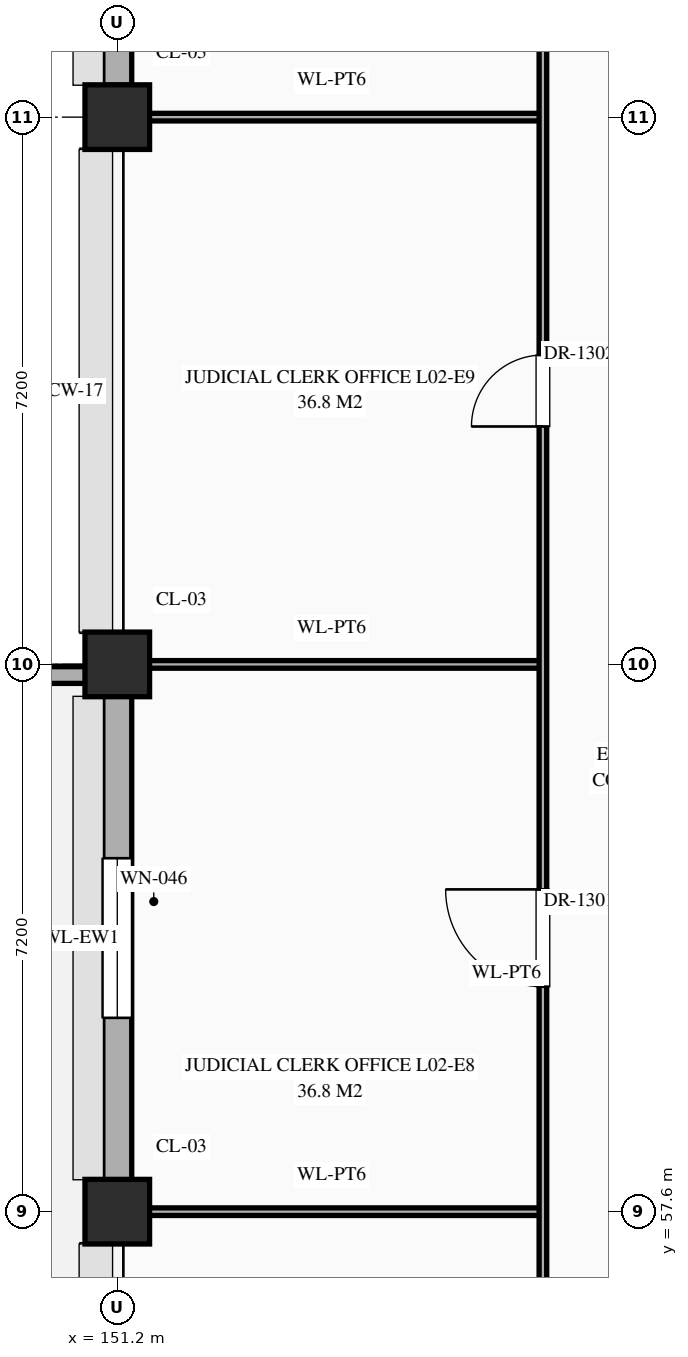
"""IFC4 building model, lengths in metres.
Left out: names, types, materials, properties, quantities, classifications, styles, units other than length and angle.
Written with IfcOpenShell. Run it as: python <this file> out.ifc"""

import sys

from ifc_helpers import new_model, si_unit, direction, frame, frame_2d, origin, origin_2d, place, context, subcontext, project, spatial, rectangle, extrude, element, fill, save


model = new_model("IFC4")
c1 = context("Model", 3, precision=1e-05, world=origin(), true_north=direction((0.0, 1.0)))
c2 = subcontext(c1, "Body", "Model", "MODEL_VIEW")
j1 = project(units=[si_unit("LENGTHUNIT", "METRE"), si_unit("PLANEANGLEUNIT", "RADIAN")], contexts=[c1])
p1 = place(None, origin())
s1 = spatial("IfcSite", under=j1, at=p1, CompositionType="ELEMENT")
p2 = place(p1, origin())
s2 = spatial("IfcBuilding", under=s1, at=p2, CompositionType="ELEMENT")
p3 = place(p2, frame((0.0, 0.0, 5.4)))
s3 = spatial("IfcBuildingStorey", under=s2, at=p3, CompositionType="ELEMENT", Elevation=5.4)
for number, where, z_axis, x_axis in (
    (1, (151.2, 57.6, 0.0), (0.0, 0.0, 1.0), (1.0, 0.0, 0.0)),
    (2, (151.2, 64.8, 0.0), (0.0, 0.0, 1.0), (1.0, 0.0, 0.0)),
    (3, (151.2, 72.0, 0.0), (0.0, 0.0, 1.0), (1.0, 0.0, 0.0)),
):
    element("IfcColumn", number, at=place(p3, frame(where, z_axis=z_axis, x_axis=x_axis)), inside=s3, PredefinedType="COLUMN", context=c2, shape_type="SweptSolid", body=[
        extrude(rectangle(XDim=0.85, YDim=0.85, at=origin_2d()), origin(), (0.0, 0.0, 1.0), 5.4),
    ])
p4 = place(p3, frame((151.2, 58.02, 0.0), z_axis=(0.0, 0.0, 1.0), x_axis=(0.0, 1.0, 0.0)))
e4 = element("IfcWall", 4, at=p4, inside=s3, PredefinedType="STANDARD", context=c2, shape_type="SweptSolid", body=[
    extrude(rectangle(XDim=6.36, YDim=0.38, at=frame_2d((3.18, 0.0))), origin(), (0.0, 0.0, 1.0), 4.47),
])
p5 = place(p4, frame((2.13, 0.0, 0.85)))
e5 = element("IfcOpeningElement", 5, at=p5, cuts=e4, PredefinedType="OPENING", context=c2, shape_type="SweptSolid", body=[
    extrude(rectangle(XDim=2.1, YDim=1.92, at=frame_2d((1.05, 0.96))), frame((0.0, 0.202, 0.0), z_axis=(0.0, -1.0, 0.0), x_axis=(1.0, 0.0, 0.0)), (0.0, 0.0, 1.0), 0.404),
])
p6 = place(p3, frame((151.2, 72.42, 0.0), z_axis=(0.0, 0.0, 1.0), x_axis=(0.0, 1.0, 0.0)))
e6 = element("IfcWall", 6, at=p6, inside=s3, PredefinedType="STANDARD", context=c2, shape_type="SweptSolid", body=[
    extrude(rectangle(XDim=6.36, YDim=0.38, at=frame_2d((3.18, 0.0))), origin(), (0.0, 0.0, 1.0), 4.47),
])
p7 = place(p6, frame((2.73, 0.0, 0.85)))
e7 = element("IfcOpeningElement", 7, at=p7, cuts=e6, PredefinedType="OPENING", context=c2, shape_type="SweptSolid", body=[
    extrude(rectangle(XDim=0.9, YDim=1.2, at=frame_2d((0.45, 0.6))), frame((0.0, 0.202, 0.0), z_axis=(0.0, -1.0, 0.0), x_axis=(1.0, 0.0, 0.0)), (0.0, 0.0, 1.0), 0.404),
])
p8 = place(p3, frame((150.9, 64.66, 4.8), z_axis=(0.0, 0.0, 1.0), x_axis=(-1.0, 0.0, 0.0)))
e8 = element("IfcWall", 8, at=p8, inside=s3, PredefinedType="PARAPET", context=c2, shape_type="SweptSolid", body=[
    extrude(rectangle(XDim=4.06, YDim=0.22, at=frame_2d((2.03, 0.0))), origin(), (0.0, 0.0, 1.0), 1.2),
])
for number, where, z_axis, x_axis in (
    (9, (151.24, 57.6, 0.0), (0.0, 0.0, 1.0), (1.0, 0.0, 0.0)),
    (10, (151.24, 64.8, 0.0), (0.0, 0.0, 1.0), (1.0, 0.0, 0.0)),
    (11, (151.24, 72.0, 0.0), (0.0, 0.0, 1.0), (1.0, 0.0, 0.0)),
):
    element("IfcWall", number, at=place(p3, frame(where, z_axis=z_axis, x_axis=x_axis)), inside=s3, PredefinedType="STANDARD", context=c2, shape_type="SweptSolid", body=[
        extrude(rectangle(XDim=5.56, YDim=0.1, at=frame_2d((2.78, 0.0))), origin(), (0.0, 0.0, 1.0), 4.27),
    ])
p9 = place(p3, frame((156.8, 43.2, 0.0), z_axis=(0.0, 0.0, 1.0), x_axis=(0.0, 1.0, 0.0)))
e12 = element("IfcWall", 12, at=p9, inside=s3, PredefinedType="STANDARD", context=c2, shape_type="SweptSolid", body=[
    extrude(rectangle(XDim=40.8, YDim=0.1, at=frame_2d((20.4, 0.0))), origin(), (0.0, 0.0, 1.0), 5.12),
])
p10 = place(p9, frame((37.95, 0.0, 0.0)))
e13 = element("IfcOpeningElement", 13, at=p10, cuts=e12, PredefinedType="OPENING", context=c2, shape_type="SweptSolid", body=[
    extrude(rectangle(XDim=0.9, YDim=2.15, at=frame_2d((0.45, 1.075))), frame((0.0, 0.062, 0.0), z_axis=(0.0, -1.0, 0.0), x_axis=(1.0, 0.0, 0.0)), (0.0, 0.0, 1.0), 0.124),
])
p11 = place(p9, frame((3.0, 0.0, 0.0)))
e14 = element("IfcOpeningElement", 14, at=p11, cuts=e12, PredefinedType="OPENING", context=c2, shape_type="SweptSolid", body=[
    extrude(rectangle(XDim=1.2, YDim=2.35, at=frame_2d((0.6, 1.175))), frame((0.0, 0.062, 0.0), z_axis=(0.0, -1.0, 0.0), x_axis=(1.0, 0.0, 0.0)), (0.0, 0.0, 1.0), 0.124),
])
p12 = place(p9, frame((10.18, 0.0, 0.0)))
e15 = element("IfcOpeningElement", 15, at=p12, cuts=e12, PredefinedType="OPENING", context=c2, shape_type="SweptSolid", body=[
    extrude(rectangle(XDim=1.24, YDim=2.3, at=frame_2d((0.62, 1.15))), frame((0.0, 0.062, 0.0), z_axis=(0.0, -1.0, 0.0), x_axis=(1.0, 0.0, 0.0)), (0.0, 0.0, 1.0), 0.124),
])
p13 = place(p9, frame((17.36, 0.0, 0.0)))
e16 = element("IfcOpeningElement", 16, at=p13, cuts=e12, PredefinedType="OPENING", context=c2, shape_type="SweptSolid", body=[
    extrude(rectangle(XDim=1.28, YDim=2.35, at=frame_2d((0.64, 1.175))), frame((0.0, 0.062, 0.0), z_axis=(0.0, -1.0, 0.0), x_axis=(1.0, 0.0, 0.0)), (0.0, 0.0, 1.0), 0.124),
])
p14 = place(p9, frame((24.73, 0.0, 0.0)))
e17 = element("IfcOpeningElement", 17, at=p14, cuts=e12, PredefinedType="OPENING", context=c2, shape_type="SweptSolid", body=[
    extrude(rectangle(XDim=0.94, YDim=2.3, at=frame_2d((0.47, 1.15))), frame((0.0, 0.062, 0.0), z_axis=(0.0, -1.0, 0.0), x_axis=(1.0, 0.0, 0.0)), (0.0, 0.0, 1.0), 0.124),
])
p15 = place(p9, frame((31.91, 0.0, 0.0)))
e18 = element("IfcOpeningElement", 18, at=p15, cuts=e12, PredefinedType="OPENING", context=c2, shape_type="SweptSolid", body=[
    extrude(rectangle(XDim=0.98, YDim=2.35, at=frame_2d((0.49, 1.175))), frame((0.0, 0.062, 0.0), z_axis=(0.0, -1.0, 0.0), x_axis=(1.0, 0.0, 0.0)), (0.0, 0.0, 1.0), 0.124),
])
p16 = place(p5, origin())
e19 = element("IfcWindow", 19, at=p16, inside=s3, PartitioningType="SINGLE_PANEL", PredefinedType="WINDOW", context=c2, shape_type="SweptSolid", body=[
    extrude(rectangle(XDim=2.1, YDim=1.92, at=frame_2d((1.05, 0.96))), frame((0.0, 0.03, 0.0), z_axis=(0.0, -1.0, 0.0), x_axis=(1.0, 0.0, 0.0)), (0.0, 0.0, 1.0), 0.06),
])
fill(e5, e19)
p17 = place(p13, origin())
e20 = element("IfcDoor", 20, at=p17, inside=s3, OperationType="SINGLE_SWING_RIGHT", PredefinedType="DOOR", context=c2, shape_type="SweptSolid", body=[
    extrude(rectangle(XDim=1.28, YDim=2.35, at=frame_2d((0.64, 1.175))), frame((0.0, 0.025, 0.0), z_axis=(0.0, -1.0, 0.0), x_axis=(1.0, 0.0, 0.0)), (0.0, 0.0, 1.0), 0.05),
])
fill(e16, e20)
p18 = place(p14, origin())
e21 = element("IfcDoor", 21, at=p18, inside=s3, OperationType="SINGLE_SWING_LEFT", PredefinedType="DOOR", context=c2, shape_type="SweptSolid", body=[
    extrude(rectangle(XDim=0.94, YDim=2.3, at=frame_2d((0.47, 1.15))), frame((0.0, 0.025, 0.0), z_axis=(0.0, -1.0, 0.0), x_axis=(1.0, 0.0, 0.0)), (0.0, 0.0, 1.0), 0.05),
])
fill(e17, e21)
save(model, sys.argv[1])
